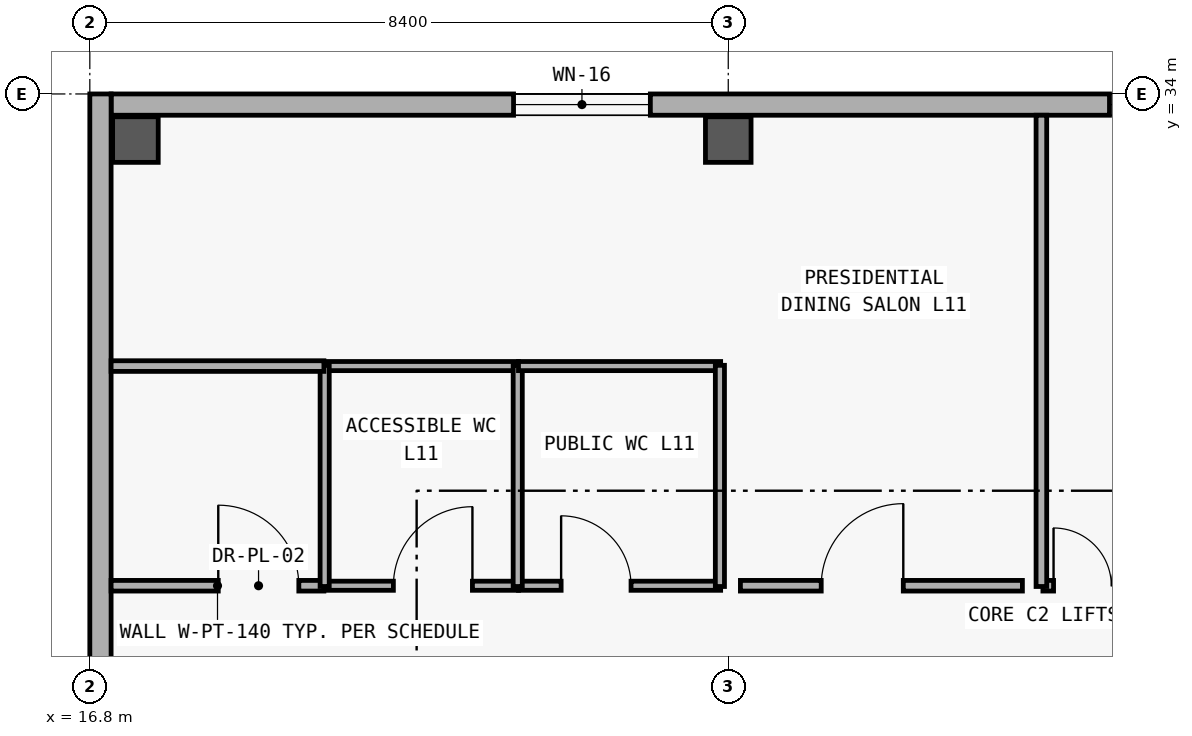
"""IFC4 building model, lengths in metres.
Left out: names, types, materials, properties, quantities, classifications, styles, units other than length and angle.
Written with IfcOpenShell. Run it as: python <this file> out.ifc"""

import sys

from ifc_helpers import new_model, si_unit, direction, frame, frame_2d, origin, origin_2d, place, context, subcontext, project, spatial, rectangle, extrude, element, fill, save


model = new_model("IFC4")
c1 = context("Model", 3, precision=1e-05, world=origin(), true_north=direction((0.0, 1.0)))
c2 = subcontext(c1, "Body", "Model", "MODEL_VIEW")
j1 = project(units=[si_unit("LENGTHUNIT", "METRE"), si_unit("PLANEANGLEUNIT", "RADIAN")], contexts=[c1])
p1 = place(None, origin())
s1 = spatial("IfcSite", under=j1, at=p1, CompositionType="ELEMENT")
p2 = place(p1, origin())
s2 = spatial("IfcBuilding", under=s1, at=p2, CompositionType="ELEMENT")
p3 = place(p2, frame((0.0, 0.0, 44.4)))
s3 = spatial("IfcBuildingStorey", under=s2, at=p3, CompositionType="ELEMENT", Elevation=44.4)
for number, where, z_axis, x_axis in (
    (1, (17.4, 33.4, 0.0), (0.0, 0.0, 1.0), (1.0, 0.0, 0.0)),
    (2, (25.2, 33.4, 0.0), (0.0, 0.0, 1.0), (1.0, 0.0, 0.0)),
):
    element("IfcColumn", number, at=place(p3, frame(where, z_axis=z_axis, x_axis=x_axis)), inside=s3, PredefinedType="COLUMN", context=c2, shape_type="SweptSolid", body=[
        extrude(rectangle(XDim=0.6, YDim=0.6, at=origin_2d()), origin(), (0.0, 0.0, 1.0), 4.2),
    ])
p4 = place(p3, frame((17.08, 33.86, 0.0), z_axis=(0.0, 0.0, 1.0), x_axis=(1.0, 0.0, 0.0)))
e3 = element("IfcWall", 3, at=p4, inside=s3, PredefinedType="SOLIDWALL", context=c2, shape_type="SweptSolid", body=[
    extrude(rectangle(XDim=49.84, YDim=0.28, at=frame_2d((24.92, 0.0))), origin(), (0.0, 0.0, 1.0), 3.96),
])
p5 = place(p4, frame((5.295, 0.0, 0.85)))
e4 = element("IfcOpeningElement", 4, at=p5, cuts=e3, PredefinedType="OPENING", context=c2, shape_type="SweptSolid", body=[
    extrude(rectangle(XDim=1.8, YDim=1.6, at=frame_2d((0.9, 0.8))), frame((0.0, 0.15, 0.0), z_axis=(0.0, -1.0, 0.0), x_axis=(1.0, 0.0, 0.0)), (0.0, 0.0, 1.0), 0.3),
])
p6 = place(p4, frame((13.136, 0.0, 0.85)))
e5 = element("IfcOpeningElement", 5, at=p6, cuts=e3, PredefinedType="OPENING", context=c2, shape_type="SweptSolid", body=[
    extrude(rectangle(XDim=2.38, YDim=1.95, at=frame_2d((1.19, 0.975))), frame((0.0, 0.15, 0.0), z_axis=(0.0, -1.0, 0.0), x_axis=(1.0, 0.0, 0.0)), (0.0, 0.0, 1.0), 0.3),
])
p7 = place(p4, frame((17.238, 0.0, 0.85)))
e6 = element("IfcOpeningElement", 6, at=p7, cuts=e3, PredefinedType="OPENING", context=c2, shape_type="SweptSolid", body=[
    extrude(rectangle(XDim=2.48, YDim=2.0, at=frame_2d((1.24, 1.0))), frame((0.0, 0.15, 0.0), z_axis=(0.0, -1.0, 0.0), x_axis=(1.0, 0.0, 0.0)), (0.0, 0.0, 1.0), 0.3),
])
p8 = place(p4, frame((21.305, 0.0, 0.85)))
e7 = element("IfcOpeningElement", 7, at=p8, cuts=e3, PredefinedType="OPENING", context=c2, shape_type="SweptSolid", body=[
    extrude(rectangle(XDim=2.65, YDim=2.0, at=frame_2d((1.325, 1.0))), frame((0.0, 0.15, 0.0), z_axis=(0.0, -1.0, 0.0), x_axis=(1.0, 0.0, 0.0)), (0.0, 0.0, 1.0), 0.3),
])
p9 = place(p4, frame((25.308, 0.0, 0.85)))
e8 = element("IfcOpeningElement", 8, at=p9, cuts=e3, PredefinedType="OPENING", context=c2, shape_type="SweptSolid", body=[
    extrude(rectangle(XDim=2.95, YDim=2.05, at=frame_2d((1.475, 1.025))), frame((0.0, 0.15, 0.0), z_axis=(0.0, -1.0, 0.0), x_axis=(1.0, 0.0, 0.0)), (0.0, 0.0, 1.0), 0.3),
])
p10 = place(p4, frame((30.035, 0.0, 0.85)))
e9 = element("IfcOpeningElement", 9, at=p10, cuts=e3, PredefinedType="OPENING", context=c2, shape_type="SweptSolid", body=[
    extrude(rectangle(XDim=1.8, YDim=1.8, at=frame_2d((0.9, 0.9))), frame((0.0, 0.15, 0.0), z_axis=(0.0, -1.0, 0.0), x_axis=(1.0, 0.0, 0.0)), (0.0, 0.0, 1.0), 0.3),
])
p11 = place(p4, frame((34.037, 0.0, 0.85)))
e10 = element("IfcOpeningElement", 10, at=p11, cuts=e3, PredefinedType="OPENING", context=c2, shape_type="SweptSolid", body=[
    extrude(rectangle(XDim=2.1, YDim=1.8, at=frame_2d((1.05, 0.9))), frame((0.0, 0.15, 0.0), z_axis=(0.0, -1.0, 0.0), x_axis=(1.0, 0.0, 0.0)), (0.0, 0.0, 1.0), 0.3),
])
p12 = place(p4, frame((38.04, 0.0, 0.85)))
e11 = element("IfcOpeningElement", 11, at=p12, cuts=e3, PredefinedType="OPENING", context=c2, shape_type="SweptSolid", body=[
    extrude(rectangle(XDim=2.4, YDim=1.8, at=frame_2d((1.2, 0.9))), frame((0.0, 0.15, 0.0), z_axis=(0.0, -1.0, 0.0), x_axis=(1.0, 0.0, 0.0)), (0.0, 0.0, 1.0), 0.3),
])
p13 = place(p4, frame((42.042, 0.0, 0.85)))
e12 = element("IfcOpeningElement", 12, at=p13, cuts=e3, PredefinedType="OPENING", context=c2, shape_type="SweptSolid", body=[
    extrude(rectangle(XDim=2.7, YDim=1.85, at=frame_2d((1.35, 0.925))), frame((0.0, 0.15, 0.0), z_axis=(0.0, -1.0, 0.0), x_axis=(1.0, 0.0, 0.0)), (0.0, 0.0, 1.0), 0.3),
])
p14 = place(p4, frame((46.044, 0.0, 0.85)))
e13 = element("IfcOpeningElement", 13, at=p14, cuts=e3, PredefinedType="OPENING", context=c2, shape_type="SweptSolid", body=[
    extrude(rectangle(XDim=3.0, YDim=1.9, at=frame_2d((1.5, 0.95))), frame((0.0, 0.15, 0.0), z_axis=(0.0, -1.0, 0.0), x_axis=(1.0, 0.0, 0.0)), (0.0, 0.0, 1.0), 0.3),
])
p15 = place(p3, frame((16.94, 8.8, 0.0), z_axis=(0.0, 0.0, 1.0), x_axis=(0.0, 1.0, 0.0)))
e14 = element("IfcWall", 14, at=p15, inside=s3, PredefinedType="SOLIDWALL", context=c2, shape_type="SweptSolid", body=[
    extrude(rectangle(XDim=25.2, YDim=0.28, at=frame_2d((12.6, 0.0))), origin(), (0.0, 0.0, 1.0), 3.96),
])
p16 = place(p15, frame((1.7, 0.0, 0.95)))
e15 = element("IfcOpeningElement", 15, at=p16, cuts=e14, PredefinedType="OPENING", context=c2, shape_type="SweptSolid", body=[
    extrude(rectangle(XDim=1.6, YDim=1.6, at=frame_2d((0.8, 0.8))), frame((0.0, 0.15, 0.0), z_axis=(0.0, -1.0, 0.0), x_axis=(1.0, 0.0, 0.0)), (0.0, 0.0, 1.0), 0.3),
])
p17 = place(p3, frame((19.88, 27.53, 0.0), z_axis=(0.0, 0.0, 1.0), x_axis=(1.0, 0.0, 0.0)))
e16 = element("IfcWall", 16, at=p17, inside=s3, PredefinedType="PARTITIONING", context=c2, shape_type="SweptSolid", body=[
    extrude(rectangle(XDim=2.56, YDim=0.12, at=frame_2d((1.28, 0.0))), origin(), (0.0, 0.0, 1.0), 3.06),
])
p18 = place(p17, frame((0.914, 0.0, 0.0)))
e17 = element("IfcOpeningElement", 17, at=p18, cuts=e16, PredefinedType="OPENING", context=c2, shape_type="SweptSolid", body=[
    extrude(rectangle(XDim=1.04, YDim=2.15, at=frame_2d((0.52, 1.075))), frame((0.0, 0.07, 0.0), z_axis=(0.0, -1.0, 0.0), x_axis=(1.0, 0.0, 0.0)), (0.0, 0.0, 1.0), 0.14),
])
p19 = place(p3, frame((22.44, 27.53, 0.0), z_axis=(0.0, 0.0, 1.0), x_axis=(1.0, 0.0, 0.0)))
e18 = element("IfcWall", 18, at=p19, inside=s3, PredefinedType="PARTITIONING", context=c2, shape_type="SweptSolid", body=[
    extrude(rectangle(XDim=2.66, YDim=0.12, at=frame_2d((1.33, 0.0))), origin(), (0.0, 0.0, 1.0), 3.06),
])
p20 = place(p19, frame((0.561, 0.0, 0.0)))
e19 = element("IfcOpeningElement", 19, at=p20, cuts=e18, PredefinedType="OPENING", context=c2, shape_type="SweptSolid", body=[
    extrude(rectangle(XDim=0.92, YDim=2.15, at=frame_2d((0.46, 1.075))), frame((0.0, 0.07, 0.0), z_axis=(0.0, -1.0, 0.0), x_axis=(1.0, 0.0, 0.0)), (0.0, 0.0, 1.0), 0.14),
])
p21 = place(p3, frame((17.08, 27.53, 0.0), z_axis=(0.0, 0.0, 1.0), x_axis=(1.0, 0.0, 0.0)))
e20 = element("IfcWall", 20, at=p21, inside=s3, PredefinedType="PARTITIONING", context=c2, shape_type="SweptSolid", body=[
    extrude(rectangle(XDim=2.8, YDim=0.14, at=frame_2d((1.4, 0.0))), origin(), (0.0, 0.0, 1.0), 3.06),
])
p22 = place(p21, frame((1.41, 0.0, 0.0)))
e21 = element("IfcOpeningElement", 21, at=p22, cuts=e20, PredefinedType="OPENING", context=c2, shape_type="SweptSolid", body=[
    extrude(rectangle(XDim=1.06, YDim=2.2, at=frame_2d((0.53, 1.1))), frame((0.0, 0.08, 0.0), z_axis=(0.0, -1.0, 0.0), x_axis=(1.0, 0.0, 0.0)), (0.0, 0.0, 1.0), 0.16),
])
p23 = place(p3, frame((25.36, 27.53, 0.0), z_axis=(0.0, 0.0, 1.0), x_axis=(1.0, 0.0, 0.0)))
e22 = element("IfcWall", 22, at=p23, inside=s3, PredefinedType="PARTITIONING", context=c2, shape_type="SweptSolid", body=[
    extrude(rectangle(XDim=3.71, YDim=0.14, at=frame_2d((1.855, 0.0))), origin(), (0.0, 0.0, 1.0), 3.06),
])
p24 = place(p23, frame((1.063, 0.0, 0.0)))
e23 = element("IfcOpeningElement", 23, at=p24, cuts=e22, PredefinedType="OPENING", context=c2, shape_type="SweptSolid", body=[
    extrude(rectangle(XDim=1.08, YDim=2.25, at=frame_2d((0.54, 1.125))), frame((0.0, 0.08, 0.0), z_axis=(0.0, -1.0, 0.0), x_axis=(1.0, 0.0, 0.0)), (0.0, 0.0, 1.0), 0.16),
])
p25 = place(p3, frame((29.34, 27.53, 0.0), z_axis=(0.0, 0.0, 1.0), x_axis=(1.0, 0.0, 0.0)))
e24 = element("IfcWall", 24, at=p25, inside=s3, PredefinedType="PARTITIONING", context=c2, shape_type="SweptSolid", body=[
    extrude(rectangle(XDim=2.675, YDim=0.14, at=frame_2d((1.337, 0.0))), origin(), (0.0, 0.0, 1.0), 3.06),
])
p26 = place(p25, frame((0.14, 0.0, 0.0)))
e25 = element("IfcOpeningElement", 25, at=p26, cuts=e24, PredefinedType="OPENING", context=c2, shape_type="SweptSolid", body=[
    extrude(rectangle(XDim=1.52, YDim=2.35, at=frame_2d((0.76, 1.175))), frame((0.0, 0.08, 0.0), z_axis=(0.0, -1.0, 0.0), x_axis=(1.0, 0.0, 0.0)), (0.0, 0.0, 1.0), 0.16),
])
p27 = place(p3, frame((19.88, 30.42, 0.0), z_axis=(0.0, 0.0, 1.0), x_axis=(1.0, 0.0, 0.0)))
e26 = element("IfcWall", 26, at=p27, inside=s3, PredefinedType="PARTITIONING", context=c2, shape_type="SweptSolid", body=[
    extrude(rectangle(XDim=2.56, YDim=0.12, at=frame_2d((1.28, 0.0))), origin(), (0.0, 0.0, 1.0), 3.06),
])
for number, where, z_axis, x_axis in (
    (27, (19.89, 27.52, 0.0), (0.0, 0.0, 1.0), (0.0, 1.0, 0.0)),
    (28, (22.43, 27.52, 0.0), (0.0, 0.0, 1.0), (0.0, 1.0, 0.0)),
):
    element("IfcWall", number, at=place(p3, frame(where, z_axis=z_axis, x_axis=x_axis)), inside=s3, PredefinedType="PARTITIONING", context=c2, shape_type="SweptSolid", body=[
        extrude(rectangle(XDim=2.91, YDim=0.12, at=frame_2d((1.455, 0.0))), origin(), (0.0, 0.0, 1.0), 3.06),
    ])
p28 = place(p3, frame((22.44, 30.42, 0.0), z_axis=(0.0, 0.0, 1.0), x_axis=(1.0, 0.0, 0.0)))
e29 = element("IfcWall", 29, at=p28, inside=s3, PredefinedType="PARTITIONING", context=c2, shape_type="SweptSolid", body=[
    extrude(rectangle(XDim=2.66, YDim=0.12, at=frame_2d((1.33, 0.0))), origin(), (0.0, 0.0, 1.0), 3.06),
])
p29 = place(p3, frame((25.09, 27.52, 0.0), z_axis=(0.0, 0.0, 1.0), x_axis=(0.0, 1.0, 0.0)))
e30 = element("IfcWall", 30, at=p29, inside=s3, PredefinedType="PARTITIONING", context=c2, shape_type="SweptSolid", body=[
    extrude(rectangle(XDim=2.91, YDim=0.12, at=frame_2d((1.455, 0.0))), origin(), (0.0, 0.0, 1.0), 3.06),
])
p30 = place(p3, frame((17.08, 30.42, 0.0), z_axis=(0.0, 0.0, 1.0), x_axis=(1.0, 0.0, 0.0)))
e31 = element("IfcWall", 31, at=p30, inside=s3, PredefinedType="PARTITIONING", context=c2, shape_type="SweptSolid", body=[
    extrude(rectangle(XDim=2.8, YDim=0.14, at=frame_2d((1.4, 0.0))), origin(), (0.0, 0.0, 1.0), 3.06),
])
p31 = place(p3, frame((29.32, 27.52, 0.0), z_axis=(0.0, 0.0, 1.0), x_axis=(0.0, 1.0, 0.0)))
e32 = element("IfcWall", 32, at=p31, inside=s3, PredefinedType="PARTITIONING", context=c2, shape_type="SweptSolid", body=[
    extrude(rectangle(XDim=6.2, YDim=0.14, at=frame_2d((3.1, 0.0))), origin(), (0.0, 0.0, 1.0), 3.06),
])
p32 = place(p5, origin())
e33 = element("IfcWindow", 33, at=p32, inside=s3, PartitioningType="SINGLE_PANEL", PredefinedType="WINDOW", context=c2, shape_type="SweptSolid", body=[
    extrude(rectangle(XDim=1.8, YDim=1.6, at=frame_2d((0.9, 0.8))), frame((0.0, 0.03, 0.0), z_axis=(0.0, -1.0, 0.0), x_axis=(1.0, 0.0, 0.0)), (0.0, 0.0, 1.0), 0.06),
])
fill(e4, e33)
p33 = place(p6, origin())
e34 = element("IfcWindow", 34, at=p33, inside=s3, PartitioningType="SINGLE_PANEL", PredefinedType="WINDOW", context=c2, shape_type="SweptSolid", body=[
    extrude(rectangle(XDim=2.38, YDim=1.95, at=frame_2d((1.19, 0.975))), frame((0.0, 0.03, 0.0), z_axis=(0.0, -1.0, 0.0), x_axis=(1.0, 0.0, 0.0)), (0.0, 0.0, 1.0), 0.06),
])
fill(e5, e34)
p34 = place(p18, origin())
e35 = element("IfcDoor", 35, at=p34, inside=s3, OperationType="SINGLE_SWING_RIGHT", PredefinedType="DOOR", context=c2, shape_type="SweptSolid", body=[
    extrude(rectangle(XDim=1.04, YDim=2.15, at=frame_2d((0.52, 1.075))), frame((0.0, 0.025, 0.0), z_axis=(0.0, -1.0, 0.0), x_axis=(1.0, 0.0, 0.0)), (0.0, 0.0, 1.0), 0.05),
])
fill(e17, e35)
p35 = place(p20, origin())
e36 = element("IfcDoor", 36, at=p35, inside=s3, OperationType="SINGLE_SWING_LEFT", PredefinedType="DOOR", context=c2, shape_type="SweptSolid", body=[
    extrude(rectangle(XDim=0.92, YDim=2.15, at=frame_2d((0.46, 1.075))), frame((0.0, 0.025, 0.0), z_axis=(0.0, -1.0, 0.0), x_axis=(1.0, 0.0, 0.0)), (0.0, 0.0, 1.0), 0.05),
])
fill(e19, e36)
p36 = place(p22, origin())
e37 = element("IfcDoor", 37, at=p36, inside=s3, OperationType="SINGLE_SWING_LEFT", PredefinedType="DOOR", context=c2, shape_type="SweptSolid", body=[
    extrude(rectangle(XDim=1.06, YDim=2.2, at=frame_2d((0.53, 1.1))), frame((0.0, 0.025, 0.0), z_axis=(0.0, -1.0, 0.0), x_axis=(1.0, 0.0, 0.0)), (0.0, 0.0, 1.0), 0.05),
])
fill(e21, e37)
p37 = place(p24, origin())
e38 = element("IfcDoor", 38, at=p37, inside=s3, OperationType="SINGLE_SWING_RIGHT", PredefinedType="DOOR", context=c2, shape_type="SweptSolid", body=[
    extrude(rectangle(XDim=1.08, YDim=2.25, at=frame_2d((0.54, 1.125))), frame((0.0, 0.025, 0.0), z_axis=(0.0, -1.0, 0.0), x_axis=(1.0, 0.0, 0.0)), (0.0, 0.0, 1.0), 0.05),
])
fill(e23, e38)
p38 = place(p26, origin())
e39 = element("IfcDoor", 39, at=p38, inside=s3, OperationType="DOUBLE_DOOR_SINGLE_SWING", PredefinedType="DOOR", context=c2, shape_type="SweptSolid", body=[
    extrude(rectangle(XDim=1.52, YDim=2.35, at=frame_2d((0.76, 1.175))), frame((0.0, 0.025, 0.0), z_axis=(0.0, -1.0, 0.0), x_axis=(1.0, 0.0, 0.0)), (0.0, 0.0, 1.0), 0.05),
])
fill(e25, e39)
save(model, sys.argv[1])
